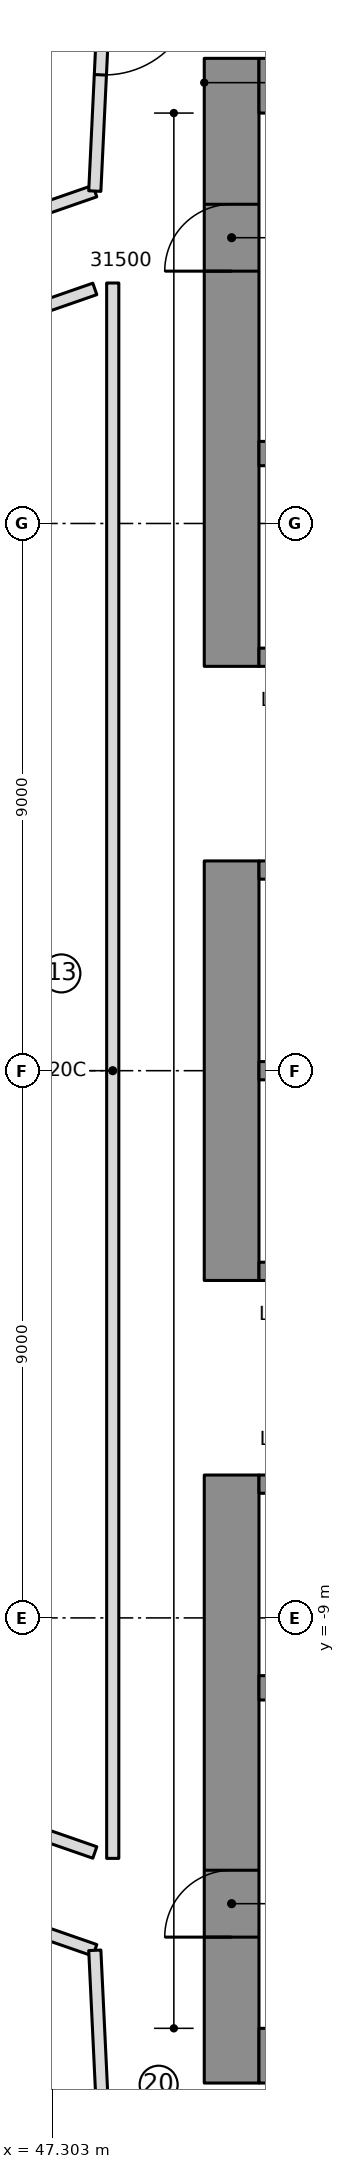
"""IFC4 building model, lengths in metres.
Left out: names, types, materials, properties, quantities, classifications, styles, units other than length and angle.
Written with IfcOpenShell. Run it as: python <this file> out.ifc"""

import sys

from ifc_helpers import new_model, si_unit, direction, frame, frame_2d, origin, place, context, subcontext, project, spatial, rectangle, extrude, element, fill, save


model = new_model("IFC4")
c1 = context("Model", 3, precision=1e-05, world=origin(), true_north=direction((0.0, 1.0)))
c2 = subcontext(c1, "Body", "Model", "MODEL_VIEW")
j1 = project(units=[si_unit("LENGTHUNIT", "METRE"), si_unit("PLANEANGLEUNIT", "RADIAN")], contexts=[c1])
p1 = place(None, origin())
s1 = spatial("IfcSite", under=j1, at=p1, CompositionType="ELEMENT")
p2 = place(p1, origin())
s2 = spatial("IfcBuilding", under=s1, at=p2, CompositionType="ELEMENT")
p3 = place(p2, frame((0.0, 0.0, 155.05)))
s3 = spatial("IfcBuildingStorey", under=s2, at=p3, CompositionType="ELEMENT", Elevation=155.05)
p4 = place(p3, frame((50.25, 6.65, 0.0), z_axis=(0.0, 0.0, 1.0), x_axis=(0.0, 1.0, 0.0)))
e1 = element("IfcWall", 1, at=p4, inside=s3, PredefinedType="SHEAR", context=c2, shape_type="SweptSolid", body=[
    extrude(rectangle(XDim=10.0, YDim=0.9, at=frame_2d((5.0, 0.0))), origin(), (0.0, 0.0, 1.0), 3.55),
])
p5 = place(p4, frame((6.5, 0.0, 0.0)))
e2 = element("IfcOpeningElement", 2, at=p5, cuts=e1, PredefinedType="OPENING", context=c2, shape_type="SweptSolid", body=[
    extrude(rectangle(XDim=1.1, YDim=2.1, at=frame_2d((0.55, 1.05))), frame((0.0, 0.46, 0.0), z_axis=(0.0, -1.0, 0.0), x_axis=(1.0, 0.0, 0.0)), (0.0, 0.0, 1.0), 0.92),
])
p6 = place(p3, frame((50.25, -3.45, 0.0), z_axis=(0.0, 0.0, 1.0), x_axis=(0.0, 1.0, 0.0)))
e3 = element("IfcWall", 3, at=p6, inside=s3, PredefinedType="SHEAR", context=c2, shape_type="SweptSolid", body=[
    extrude(rectangle(XDim=6.9, YDim=0.9, at=frame_2d((3.45, 0.0))), origin(), (0.0, 0.0, 1.0), 3.55),
])
p7 = place(p3, frame((50.25, -16.65, 0.0), z_axis=(0.0, 0.0, 1.0), x_axis=(0.0, 1.0, 0.0)))
e4 = element("IfcWall", 4, at=p7, inside=s3, PredefinedType="SHEAR", context=c2, shape_type="SweptSolid", body=[
    extrude(rectangle(XDim=10.0, YDim=0.9, at=frame_2d((5.0, 0.0))), origin(), (0.0, 0.0, 1.0), 3.55),
])
p8 = place(p7, frame((2.4, 0.0, 0.0)))
e5 = element("IfcOpeningElement", 5, at=p8, cuts=e4, PredefinedType="OPENING", context=c2, shape_type="SweptSolid", body=[
    extrude(rectangle(XDim=1.1, YDim=2.1, at=frame_2d((0.55, 1.05))), frame((0.0, 0.46, 0.0), z_axis=(0.0, -1.0, 0.0), x_axis=(1.0, 0.0, 0.0)), (0.0, 0.0, 1.0), 0.92),
])
for number, where, z_axis, x_axis in (
    (6, (50.7, 16.2, 0.0), (0.0, 0.0, 1.0), (1.0, 0.0, 0.0)),
    (7, (50.7, -16.2, 0.0), (0.0, 0.0, 1.0), (1.0, 0.0, 0.0)),
):
    element("IfcWall", number, at=place(p3, frame(where, z_axis=z_axis, x_axis=x_axis)), inside=s3, PredefinedType="SHEAR", context=c2, shape_type="SweptSolid", body=[
        extrude(rectangle(XDim=13.92, YDim=0.9, at=frame_2d((6.96, 0.0))), origin(), (0.0, 0.0, 1.0), 3.55),
    ])
p9 = place(p3, frame((50.7, 10.15, 0.0), z_axis=(0.0, 0.0, 1.0), x_axis=(1.0, 0.0, 0.0)))
e8 = element("IfcWall", 8, at=p9, inside=s3, PredefinedType="SHEAR", context=c2, shape_type="SweptSolid", body=[
    extrude(rectangle(XDim=13.02, YDim=0.4, at=frame_2d((6.51, 0.0))), origin(), (0.0, 0.0, 1.0), 3.55),
])
p10 = place(p9, frame((0.7, 0.0, 0.0)))
e9 = element("IfcOpeningElement", 9, at=p10, cuts=e8, PredefinedType="OPENING", context=c2, shape_type="SweptSolid", body=[
    extrude(rectangle(XDim=1.1, YDim=2.1, at=frame_2d((0.55, 1.05))), frame((0.0, 0.21, 0.0), z_axis=(0.0, -1.0, 0.0), x_axis=(1.0, 0.0, 0.0)), (0.0, 0.0, 1.0), 0.42),
])
p11 = place(p9, frame((3.5, 0.0, 0.0)))
e10 = element("IfcOpeningElement", 10, at=p11, cuts=e8, PredefinedType="OPENING", context=c2, shape_type="SweptSolid", body=[
    extrude(rectangle(XDim=1.1, YDim=2.1, at=frame_2d((0.55, 1.05))), frame((0.0, 0.21, 0.0), z_axis=(0.0, -1.0, 0.0), x_axis=(1.0, 0.0, 0.0)), (0.0, 0.0, 1.0), 0.42),
])
p12 = place(p3, frame((50.7, -10.15, 0.0), z_axis=(0.0, 0.0, 1.0), x_axis=(1.0, 0.0, 0.0)))
e11 = element("IfcWall", 11, at=p12, inside=s3, PredefinedType="SHEAR", context=c2, shape_type="SweptSolid", body=[
    extrude(rectangle(XDim=13.02, YDim=0.4, at=frame_2d((6.51, 0.0))), origin(), (0.0, 0.0, 1.0), 3.55),
])
p13 = place(p3, frame((50.7, 0.0, 0.0), z_axis=(0.0, 0.0, 1.0), x_axis=(1.0, 0.0, 0.0)))
e12 = element("IfcWall", 12, at=p13, inside=s3, PredefinedType="SHEAR", context=c2, shape_type="SweptSolid", body=[
    extrude(rectangle(XDim=10.9, YDim=0.3, at=frame_2d((5.45, 0.0))), origin(), (0.0, 0.0, 1.0), 3.55),
])
p14 = place(p3, frame((50.7, 3.3, 0.0), z_axis=(0.0, 0.0, 1.0), x_axis=(1.0, 0.0, 0.0)))
e13 = element("IfcWall", 13, at=p14, inside=s3, PredefinedType="SHEAR", context=c2, shape_type="SweptSolid", body=[
    extrude(rectangle(XDim=10.9, YDim=0.3, at=frame_2d((5.45, 0.0))), origin(), (0.0, 0.0, 1.0), 3.55),
])
p15 = place(p14, frame((0.8, 0.0, 0.0)))
e14 = element("IfcOpeningElement", 14, at=p15, cuts=e13, PredefinedType="OPENING", context=c2, shape_type="SweptSolid", body=[
    extrude(rectangle(XDim=0.9, YDim=2.1, at=frame_2d((0.45, 1.05))), frame((0.0, 0.16, 0.0), z_axis=(0.0, -1.0, 0.0), x_axis=(1.0, 0.0, 0.0)), (0.0, 0.0, 1.0), 0.32),
])
p16 = place(p14, frame((3.6, 0.0, 0.0)))
e15 = element("IfcOpeningElement", 15, at=p16, cuts=e13, PredefinedType="OPENING", context=c2, shape_type="SweptSolid", body=[
    extrude(rectangle(XDim=0.9, YDim=2.1, at=frame_2d((0.45, 1.05))), frame((0.0, 0.16, 0.0), z_axis=(0.0, -1.0, 0.0), x_axis=(1.0, 0.0, 0.0)), (0.0, 0.0, 1.0), 0.32),
])
p17 = place(p14, frame((6.4, 0.0, 0.0)))
e16 = element("IfcOpeningElement", 16, at=p17, cuts=e13, PredefinedType="OPENING", context=c2, shape_type="SweptSolid", body=[
    extrude(rectangle(XDim=0.9, YDim=2.1, at=frame_2d((0.45, 1.05))), frame((0.0, 0.16, 0.0), z_axis=(0.0, -1.0, 0.0), x_axis=(1.0, 0.0, 0.0)), (0.0, 0.0, 1.0), 0.32),
])
p18 = place(p14, frame((9.2, 0.0, 0.0)))
e17 = element("IfcOpeningElement", 17, at=p18, cuts=e13, PredefinedType="OPENING", context=c2, shape_type="SweptSolid", body=[
    extrude(rectangle(XDim=0.9, YDim=2.1, at=frame_2d((0.45, 1.05))), frame((0.0, 0.16, 0.0), z_axis=(0.0, -1.0, 0.0), x_axis=(1.0, 0.0, 0.0)), (0.0, 0.0, 1.0), 0.32),
])
p19 = place(p3, frame((50.7, 6.8, 0.0), z_axis=(0.0, 0.0, 1.0), x_axis=(1.0, 0.0, 0.0)))
e18 = element("IfcWall", 18, at=p19, inside=s3, PredefinedType="SHEAR", context=c2, shape_type="SweptSolid", body=[
    extrude(rectangle(XDim=10.9, YDim=0.3, at=frame_2d((5.45, 0.0))), origin(), (0.0, 0.0, 1.0), 3.55),
])
p20 = place(p19, frame((6.3, 0.0, 0.0)))
e19 = element("IfcOpeningElement", 19, at=p20, cuts=e18, PredefinedType="OPENING", context=c2, shape_type="SweptSolid", body=[
    extrude(rectangle(XDim=1.1, YDim=2.1, at=frame_2d((0.55, 1.05))), frame((0.0, 0.16, 0.0), z_axis=(0.0, -1.0, 0.0), x_axis=(1.0, 0.0, 0.0)), (0.0, 0.0, 1.0), 0.32),
])
p21 = place(p19, frame((9.1, 0.0, 0.0)))
e20 = element("IfcOpeningElement", 20, at=p21, cuts=e18, PredefinedType="OPENING", context=c2, shape_type="SweptSolid", body=[
    extrude(rectangle(XDim=1.1, YDim=2.1, at=frame_2d((0.55, 1.05))), frame((0.0, 0.16, 0.0), z_axis=(0.0, -1.0, 0.0), x_axis=(1.0, 0.0, 0.0)), (0.0, 0.0, 1.0), 0.32),
])
p22 = place(p3, frame((50.7, -3.3, 0.0), z_axis=(0.0, 0.0, 1.0), x_axis=(1.0, 0.0, 0.0)))
e21 = element("IfcWall", 21, at=p22, inside=s3, PredefinedType="SHEAR", context=c2, shape_type="SweptSolid", body=[
    extrude(rectangle(XDim=10.9, YDim=0.3, at=frame_2d((5.45, 0.0))), origin(), (0.0, 0.0, 1.0), 3.55),
])
p23 = place(p22, frame((9.2, 0.0, 0.0)))
e22 = element("IfcOpeningElement", 22, at=p23, cuts=e21, PredefinedType="OPENING", context=c2, shape_type="SweptSolid", body=[
    extrude(rectangle(XDim=0.9, YDim=2.1, at=frame_2d((0.45, 1.05))), frame((0.0, 0.16, 0.0), z_axis=(0.0, -1.0, 0.0), x_axis=(1.0, 0.0, 0.0)), (0.0, 0.0, 1.0), 0.32),
])
p24 = place(p3, frame((50.7, -6.8, 0.0), z_axis=(0.0, 0.0, 1.0), x_axis=(1.0, 0.0, 0.0)))
e23 = element("IfcWall", 23, at=p24, inside=s3, PredefinedType="SHEAR", context=c2, shape_type="SweptSolid", body=[
    extrude(rectangle(XDim=10.9, YDim=0.3, at=frame_2d((5.45, 0.0))), origin(), (0.0, 0.0, 1.0), 3.55),
])
p25 = place(p24, frame((0.7, 0.0, 0.0)))
e24 = element("IfcOpeningElement", 24, at=p25, cuts=e23, PredefinedType="OPENING", context=c2, shape_type="SweptSolid", body=[
    extrude(rectangle(XDim=1.1, YDim=2.1, at=frame_2d((0.55, 1.05))), frame((0.0, 0.16, 0.0), z_axis=(0.0, -1.0, 0.0), x_axis=(1.0, 0.0, 0.0)), (0.0, 0.0, 1.0), 0.32),
])
p26 = place(p24, frame((3.5, 0.0, 0.0)))
e25 = element("IfcOpeningElement", 25, at=p26, cuts=e23, PredefinedType="OPENING", context=c2, shape_type="SweptSolid", body=[
    extrude(rectangle(XDim=1.1, YDim=2.1, at=frame_2d((0.55, 1.05))), frame((0.0, 0.16, 0.0), z_axis=(0.0, -1.0, 0.0), x_axis=(1.0, 0.0, 0.0)), (0.0, 0.0, 1.0), 0.32),
])
p27 = place(p24, frame((6.3, 0.0, 0.0)))
e26 = element("IfcOpeningElement", 26, at=p27, cuts=e23, PredefinedType="OPENING", context=c2, shape_type="SweptSolid", body=[
    extrude(rectangle(XDim=1.1, YDim=2.1, at=frame_2d((0.55, 1.05))), frame((0.0, 0.16, 0.0), z_axis=(0.0, -1.0, 0.0), x_axis=(1.0, 0.0, 0.0)), (0.0, 0.0, 1.0), 0.32),
])
p28 = place(p24, frame((9.1, 0.0, 0.0)))
e27 = element("IfcOpeningElement", 27, at=p28, cuts=e23, PredefinedType="OPENING", context=c2, shape_type="SweptSolid", body=[
    extrude(rectangle(XDim=1.1, YDim=2.1, at=frame_2d((0.55, 1.05))), frame((0.0, 0.16, 0.0), z_axis=(0.0, -1.0, 0.0), x_axis=(1.0, 0.0, 0.0)), (0.0, 0.0, 1.0), 0.32),
])
for number, where, z_axis, x_axis in (
    (28, (48.0, 14.467, 0.0), (0.0, 0.0, 1.0), (-0.945, -0.328, 0.0)),
    (29, (47.012, -14.124, 0.0), (0.0, 0.0, 1.0), (0.945, -0.328, 0.0)),
):
    element("IfcWall", number, at=place(p3, frame(where, z_axis=z_axis, x_axis=x_axis)), inside=s3, PredefinedType="PARTITIONING", context=c2, shape_type="SweptSolid", body=[
        extrude(rectangle(XDim=1.045, YDim=0.2, at=frame_2d((0.523, 0.0))), origin(), (0.0, 0.0, 1.0), 3.25),
    ])
for number, where, z_axis, x_axis in (
    (30, (46.781, 12.434, 0.0), (0.0, 0.0, 1.0), (0.945, 0.328, 0.0)),
    (31, (48.0, -12.858, 0.0), (0.0, 0.0, 1.0), (-0.945, 0.328, 0.0)),
):
    element("IfcWall", number, at=place(p3, frame(where, z_axis=z_axis, x_axis=x_axis)), inside=s3, PredefinedType="PARTITIONING", context=c2, shape_type="SweptSolid", body=[
        extrude(rectangle(XDim=1.29, YDim=0.2, at=frame_2d((0.645, 0.0))), origin(), (0.0, 0.0, 1.0), 3.25),
    ])
p29 = place(p3, frame((48.279, 20.289, 0.0), z_axis=(0.0, 0.0, 1.0), x_axis=(-0.047837808481, -0.998855116661, 0.0)))
e32 = element("IfcWall", 32, at=p29, inside=s3, PredefinedType="PARTITIONING", context=c2, shape_type="SweptSolid", body=[
    extrude(rectangle(XDim=5.828, YDim=0.2, at=frame_2d((2.914, 0.0))), origin(), (0.0, 0.0, 1.0), 3.25),
])
p30 = place(p29, frame((2.414, 0.0, 0.0)))
e33 = element("IfcOpeningElement", 33, at=p30, cuts=e32, PredefinedType="OPENING", context=c2, shape_type="SweptSolid", body=[
    extrude(rectangle(XDim=1.5, YDim=2.1, at=frame_2d((0.75, 1.05))), frame((0.0, 0.11, 0.0), z_axis=(0.0, -1.0, 0.0), x_axis=(1.0, 0.0, 0.0)), (0.0, 0.0, 1.0), 0.22),
])
p31 = place(p3, frame((48.0, -14.467, 0.0), z_axis=(0.0, 0.0, 1.0), x_axis=(0.047837808481, -0.998855116661, 0.0)))
e34 = element("IfcWall", 34, at=p31, inside=s3, PredefinedType="PARTITIONING", context=c2, shape_type="SweptSolid", body=[
    extrude(rectangle(XDim=5.828, YDim=0.2, at=frame_2d((2.914, 0.0))), origin(), (0.0, 0.0, 1.0), 3.25),
])
p32 = place(p31, frame((2.414, 0.0, 0.0)))
e35 = element("IfcOpeningElement", 35, at=p32, cuts=e34, PredefinedType="OPENING", context=c2, shape_type="SweptSolid", body=[
    extrude(rectangle(XDim=1.5, YDim=2.1, at=frame_2d((0.75, 1.05))), frame((0.0, 0.11, 0.0), z_axis=(0.0, -1.0, 0.0), x_axis=(1.0, 0.0, 0.0)), (0.0, 0.0, 1.0), 0.22),
])
p33 = place(p3, frame((48.295, 12.955, 0.0), z_axis=(0.0, 0.0, 1.0), x_axis=(0.0, -1.0, 0.0)))
e36 = element("IfcWall", 36, at=p33, inside=s3, PredefinedType="PARTITIONING", context=c2, shape_type="SweptSolid", body=[
    extrude(rectangle(XDim=25.91, YDim=0.2, at=frame_2d((12.955, 0.0))), origin(), (0.0, 0.0, 1.0), 3.25),
])
p34 = place(p30, origin())
e37 = element("IfcDoor", 37, at=p34, inside=s3, OperationType="DOUBLE_DOOR_SINGLE_SWING", PredefinedType="DOOR", context=c2, shape_type="SweptSolid", body=[
    extrude(rectangle(XDim=1.5, YDim=2.1, at=frame_2d((0.75, 1.05))), frame((0.0, 0.025, 0.0), z_axis=(0.0, -1.0, 0.0), x_axis=(1.0, 0.0, 0.0)), (0.0, 0.0, 1.0), 0.05),
])
fill(e33, e37)
p35 = place(p5, origin())
e38 = element("IfcDoor", 38, at=p35, inside=s3, OperationType="SINGLE_SWING_RIGHT", PredefinedType="DOOR", context=c2, shape_type="SweptSolid", body=[
    extrude(rectangle(XDim=1.1, YDim=2.1, at=frame_2d((0.55, 1.05))), frame((0.0, 0.025, 0.0), z_axis=(0.0, -1.0, 0.0), x_axis=(1.0, 0.0, 0.0)), (0.0, 0.0, 1.0), 0.05),
])
fill(e2, e38)
p36 = place(p8, origin())
e39 = element("IfcDoor", 39, at=p36, inside=s3, OperationType="SINGLE_SWING_RIGHT", PredefinedType="DOOR", context=c2, shape_type="SweptSolid", body=[
    extrude(rectangle(XDim=1.1, YDim=2.1, at=frame_2d((0.55, 1.05))), frame((0.0, 0.025, 0.0), z_axis=(0.0, -1.0, 0.0), x_axis=(1.0, 0.0, 0.0)), (0.0, 0.0, 1.0), 0.05),
])
fill(e5, e39)
save(model, sys.argv[1])
